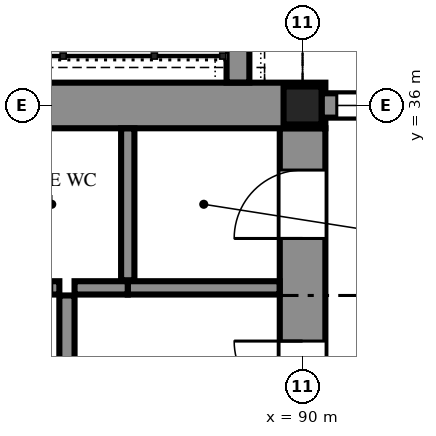
"""IFC4 building model, lengths in metres.
Left out: names, types, materials, properties, quantities, classifications, styles, units other than length and angle.
Written with IfcOpenShell. Run it as: python <this file> out.ifc"""

import sys

from ifc_helpers import new_model, si_unit, direction, frame, frame_2d, origin, origin_2d, place, context, subcontext, project, spatial, polyline, rectangle, hollow_rectangle, outline, extrude, element, fill, save


model = new_model("IFC4")
c1 = context("Model", 3, precision=1e-05, world=origin(), true_north=direction((0.0, 1.0)))
c2 = subcontext(c1, "Body", "Model", "MODEL_VIEW")
j1 = project(units=[si_unit("LENGTHUNIT", "METRE"), si_unit("PLANEANGLEUNIT", "RADIAN")], contexts=[c1])
p1 = place(None, origin())
s1 = spatial("IfcSite", under=j1, at=p1, CompositionType="ELEMENT")
p2 = place(p1, origin())
s2 = spatial("IfcBuilding", under=s1, at=p2, CompositionType="ELEMENT")
p3 = place(p2, origin())
s3 = spatial("IfcBuildingStorey", under=s2, at=p3, CompositionType="ELEMENT", Elevation=0.0)
p4 = place(p3, frame((90.0, 36.0, -2.1), z_axis=(0.0, 0.0, 1.0), x_axis=(1.0, 0.0, 0.0)))
e1 = element("IfcColumn", 1, at=p4, inside=s3, PredefinedType="COLUMN", context=c2, shape_type="SweptSolid", body=[
    extrude(hollow_rectangle(XDim=0.5, YDim=0.5, WallThickness=0.032, at=origin_2d()), origin(), (0.0, 0.0, 1.0), 9.6),
])
p5 = place(p3, frame((71.7, 36.0, -2.1), z_axis=(0.0, 0.0, 1.0), x_axis=(1.0, 0.0, 0.0)))
e2 = element("IfcWall", 2, at=p5, inside=s3, PredefinedType="SOLIDWALL", context=c2, shape_type="SweptSolid", body=[
    extrude(rectangle(XDim=18.6, YDim=0.6, at=frame_2d((9.3, 0.0))), origin(), (0.0, 0.0, 1.0), 9.6),
])
p6 = place(p5, frame((1.6, 0.0, 2.1)))
e3 = element("IfcOpeningElement", 3, at=p6, cuts=e2, PredefinedType="OPENING", context=c2, shape_type="SweptSolid", body=[
    extrude(rectangle(XDim=1.8, YDim=2.1, at=frame_2d((0.9, 1.05))), frame((0.0, 0.31, 0.0), z_axis=(0.0, -1.0, 0.0), x_axis=(1.0, 0.0, 0.0)), (0.0, 0.0, 1.0), 0.62),
])
p7 = place(p5, frame((5.6, 0.0, 2.1)))
e4 = element("IfcOpeningElement", 4, at=p7, cuts=e2, PredefinedType="OPENING", context=c2, shape_type="SweptSolid", body=[
    extrude(rectangle(XDim=1.8, YDim=2.1, at=frame_2d((0.9, 1.05))), frame((0.0, 0.31, 0.0), z_axis=(0.0, -1.0, 0.0), x_axis=(1.0, 0.0, 0.0)), (0.0, 0.0, 1.0), 0.62),
])
p8 = place(p5, frame((9.1, 0.0, 2.1)))
e5 = element("IfcOpeningElement", 5, at=p8, cuts=e2, PredefinedType="OPENING", context=c2, shape_type="SweptSolid", body=[
    extrude(rectangle(XDim=1.8, YDim=2.1, at=frame_2d((0.9, 1.05))), frame((0.0, 0.31, 0.0), z_axis=(0.0, -1.0, 0.0), x_axis=(1.0, 0.0, 0.0)), (0.0, 0.0, 1.0), 0.62),
])
p9 = place(p3, frame((90.0, 27.3, -2.1), z_axis=(0.0, 0.0, 1.0), x_axis=(0.0, 1.0, 0.0)))
e6 = element("IfcWall", 6, at=p9, inside=s3, PredefinedType="SOLIDWALL", context=c2, shape_type="SweptSolid", body=[
    extrude(rectangle(XDim=8.4, YDim=0.6, at=frame_2d((4.2, 0.0))), origin(), (0.0, 0.0, 1.0), 9.6),
])
p10 = place(p9, frame((3.8, 0.0, 2.1)))
e7 = element("IfcOpeningElement", 7, at=p10, cuts=e6, PredefinedType="OPENING", context=c2, shape_type="SweptSolid", body=[
    extrude(rectangle(XDim=1.8, YDim=2.1, at=frame_2d((0.9, 1.05))), frame((0.0, 0.31, 0.0), z_axis=(0.0, -1.0, 0.0), x_axis=(1.0, 0.0, 0.0)), (0.0, 0.0, 1.0), 0.62),
])
p11 = place(p9, frame((6.95, 0.0, 2.1)))
e8 = element("IfcOpeningElement", 8, at=p11, cuts=e6, PredefinedType="OPENING", context=c2, shape_type="SweptSolid", body=[
    extrude(rectangle(XDim=0.9, YDim=2.1, at=frame_2d((0.45, 1.05))), frame((0.0, 0.31, 0.0), z_axis=(0.0, -1.0, 0.0), x_axis=(1.0, 0.0, 0.0)), (0.0, 0.0, 1.0), 0.62),
])
p12 = place(p3, frame((90.25, 36.0, 0.0), z_axis=(0.0, 0.0, 1.0), x_axis=(1.0, 0.0, 0.0)))
e9 = element("IfcWall", 9, at=p12, inside=s3, PredefinedType="SOLIDWALL", context=c2, shape_type="SweptSolid", body=[
    extrude(rectangle(XDim=8.445, YDim=0.32, at=frame_2d((4.223, 0.0))), origin(), (0.0, 0.0, 1.0), 6.767),
])
p13 = place(p12, frame((3.05, 0.0, 0.0)))
e10 = element("IfcOpeningElement", 10, at=p13, cuts=e9, PredefinedType="OPENING", context=c2, shape_type="SweptSolid", body=[
    extrude(rectangle(XDim=2.4, YDim=3.0, at=frame_2d((1.2, 1.5))), frame((0.0, 0.17, 0.0), z_axis=(0.0, -1.0, 0.0), x_axis=(1.0, 0.0, 0.0)), (0.0, 0.0, 1.0), 0.34),
])
p14 = place(p12, frame((0.2, 0.0, 0.9)))
e11 = element("IfcOpeningElement", 11, at=p14, cuts=e9, PredefinedType="OPENING", context=c2, shape_type="SweptSolid", body=[
    extrude(rectangle(XDim=2.1, YDim=3.0, at=frame_2d((1.05, 1.5))), frame((0.0, 0.17, 0.0), z_axis=(0.0, -1.0, 0.0), x_axis=(1.0, 0.0, 0.0)), (0.0, 0.0, 1.0), 0.34),
])
p15 = place(p12, frame((6.2, 0.0, 0.9)))
e12 = element("IfcOpeningElement", 12, at=p15, cuts=e9, PredefinedType="OPENING", context=c2, shape_type="SweptSolid", body=[
    extrude(rectangle(XDim=2.1, YDim=3.0, at=frame_2d((1.05, 1.5))), frame((0.0, 0.17, 0.0), z_axis=(0.0, -1.0, 0.0), x_axis=(1.0, 0.0, 0.0)), (0.0, 0.0, 1.0), 0.34),
])
p16 = place(p3, frame((89.15, 36.302, 0.0), z_axis=(0.0, 0.0, 1.0), x_axis=(0.0, 1.0, 0.0)))
e13 = element("IfcWall", 13, at=p16, inside=s3, PredefinedType="SOLIDWALL", context=c2, shape_type="SweptSolid", body=[
    extrude(rectangle(XDim=8.098, YDim=0.3, at=frame_2d((4.049, 0.0))), origin(), (0.0, 0.0, 1.0), 6.902),
])
p17 = place(p3, frame((86.9, 33.5, 0.0), z_axis=(0.0, 0.0, 1.0), x_axis=(0.0, -1.0, 0.0)))
e14 = element("IfcWall", 14, at=p17, inside=s3, PredefinedType="PARTITIONING", context=c2, shape_type="SweptSolid", body=[
    extrude(rectangle(XDim=3.1, YDim=0.2, at=frame_2d((1.55, 0.0))), origin(), (0.0, 0.0, 1.0), 6.6),
])
p18 = place(p17, frame((0.9, 0.0, 0.0)))
e15 = element("IfcOpeningElement", 15, at=p18, cuts=e14, PredefinedType="OPENING", context=c2, shape_type="SweptSolid", body=[
    extrude(rectangle(XDim=1.2, YDim=2.1, at=frame_2d((0.6, 1.05))), frame((0.0, 0.11, 0.0), z_axis=(0.0, -1.0, 0.0), x_axis=(1.0, 0.0, 0.0)), (0.0, 0.0, 1.0), 0.22),
])
p19 = place(p3, frame((85.7, 33.6, 0.0), z_axis=(0.0, 0.0, 1.0), x_axis=(1.0, 0.0, 0.0)))
e16 = element("IfcWall", 16, at=p19, inside=s3, PredefinedType="PARTITIONING", context=c2, shape_type="SweptSolid", body=[
    extrude(rectangle(XDim=1.1, YDim=0.175, at=frame_2d((0.55, 0.0))), origin(), (0.0, 0.0, 1.0), 6.459),
])
p20 = place(p19, frame((0.1, 0.0, 0.0)))
e17 = element("IfcOpeningElement", 17, at=p20, cuts=e16, PredefinedType="OPENING", context=c2, shape_type="SweptSolid", body=[
    extrude(rectangle(XDim=0.9, YDim=2.1, at=frame_2d((0.45, 1.05))), frame((0.0, 0.097, 0.0), z_axis=(0.0, -1.0, 0.0), x_axis=(1.0, 0.0, 0.0)), (0.0, 0.0, 1.0), 0.195),
])
p21 = place(p3, frame((87.7, 33.6, 0.0), z_axis=(0.0, 0.0, 1.0), x_axis=(1.0, 0.0, 0.0)))
e18 = element("IfcWall", 18, at=p21, inside=s3, PredefinedType="PARTITIONING", context=c2, shape_type="SweptSolid", body=[
    extrude(rectangle(XDim=1.998, YDim=0.175, at=frame_2d((0.999, 0.0))), origin(), (0.0, 0.0, 1.0), 6.459),
])
p22 = place(p3, frame((87.0, 33.6, 0.0), z_axis=(0.0, 0.0, 1.0), x_axis=(1.0, 0.0, 0.0)))
e19 = element("IfcWall", 19, at=p22, inside=s3, PredefinedType="PARTITIONING", context=c2, shape_type="SweptSolid", body=[
    extrude(rectangle(XDim=0.7, YDim=0.175, at=frame_2d((0.35, 0.0))), origin(), (0.0, 0.0, 1.0), 6.459),
])
p23 = place(p3, frame((87.7, 35.698, 0.0), z_axis=(0.0, 0.0, 1.0), x_axis=(0.0, -1.0, 0.0)))
e20 = element("IfcWall", 20, at=p23, inside=s3, PredefinedType="PARTITIONING", context=c2, shape_type="SweptSolid", body=[
    extrude(rectangle(XDim=1.998, YDim=0.175, at=frame_2d((0.999, 0.0))), origin(), (0.0, 0.0, 1.0), 6.459),
])
p24 = place(p14, origin())
e21 = element("IfcWindow", 21, at=p24, inside=s3, PartitioningType="DOUBLE_PANEL_VERTICAL", PredefinedType="WINDOW", context=c2, shape_type="SweptSolid", body=[
    extrude(outline(polyline([(0.0, 0.0), (2.1, 0.0), (2.1, 3.0), (0.0, 3.0), (0.0, 0.0)]), holes=[polyline([(0.07, 0.07), (2.03, 0.07), (2.03, 2.93), (0.07, 2.93), (0.07, 0.07)])]), frame((0.0, 0.03, 0.0), z_axis=(0.0, -1.0, 0.0), x_axis=(1.0, 0.0, 0.0)), (0.0, 0.0, 1.0), 0.06),
    extrude(rectangle(XDim=0.04, YDim=2.86, at=frame_2d((1.05, 1.5))), frame((0.0, 0.022, 0.0), z_axis=(0.0, -1.0, 0.0), x_axis=(1.0, 0.0, 0.0)), (0.0, 0.0, 1.0), 0.044),
    extrude(outline(polyline([(0.07, 0.07), (1.03, 0.07), (1.03, 2.93), (0.07, 2.93), (0.07, 0.07)]), holes=[polyline([(0.1, 0.1), (1.0, 0.1), (1.0, 2.9), (0.1, 2.9), (0.1, 0.1)])]), frame((0.0, 0.022, 0.0), z_axis=(0.0, -1.0, 0.0), x_axis=(1.0, 0.0, 0.0)), (0.0, 0.0, 1.0), 0.045),
    extrude(rectangle(XDim=0.9, YDim=2.8, at=frame_2d((0.55, 1.5))), frame((0.0, 0.006, 0.0), z_axis=(0.0, -1.0, 0.0), x_axis=(1.0, 0.0, 0.0)), (0.0, 0.0, 1.0), 0.012),
    extrude(outline(polyline([(1.07, 0.07), (2.03, 0.07), (2.03, 2.93), (1.07, 2.93), (1.07, 0.07)]), holes=[polyline([(1.1, 0.1), (2.0, 0.1), (2.0, 2.9), (1.1, 2.9), (1.1, 0.1)])]), frame((0.0, 0.022, 0.0), z_axis=(0.0, -1.0, 0.0), x_axis=(1.0, 0.0, 0.0)), (0.0, 0.0, 1.0), 0.045),
    extrude(rectangle(XDim=0.9, YDim=2.8, at=frame_2d((1.55, 1.5))), frame((0.0, 0.006, 0.0), z_axis=(0.0, -1.0, 0.0), x_axis=(1.0, 0.0, 0.0)), (0.0, 0.0, 1.0), 0.012),
])
fill(e11, e21)
p25 = place(p10, origin())
e22 = element("IfcDoor", 22, at=p25, inside=s3, OperationType="DOUBLE_DOOR_SINGLE_SWING", PredefinedType="DOOR", context=c2, shape_type="SweptSolid", body=[
    extrude(outline(polyline([(0.0, 0.0), (0.07, 0.0), (0.07, 2.03), (1.73, 2.03), (1.73, 0.0), (1.8, 0.0), (1.8, 2.1), (0.0, 2.1), (0.0, 0.0)])), frame((0.0, 0.025, 0.0), z_axis=(0.0, -1.0, 0.0), x_axis=(1.0, 0.0, 0.0)), (0.0, 0.0, 1.0), 0.05),
    extrude(outline(polyline([(0.074, 0.01), (0.897, 0.01), (0.897, 2.026), (0.074, 2.026), (0.074, 0.01)]), holes=[polyline([(0.194, 0.16), (0.777, 0.16), (0.777, 1.01), (0.194, 1.01), (0.194, 0.16)]), polyline([(0.335, 1.16), (0.635, 1.16), (0.635, 1.76), (0.335, 1.76), (0.335, 1.16)])]), frame((0.0, 0.017, 0.0), z_axis=(0.0, -1.0, 0.0), x_axis=(1.0, 0.0, 0.0)), (0.0, 0.0, 1.0), 0.035),
    extrude(rectangle(XDim=0.583, YDim=0.85, at=frame_2d((0.485, 0.585))), frame((0.0, 0.009, 0.0), z_axis=(0.0, -1.0, 0.0), x_axis=(1.0, 0.0, 0.0)), (0.0, 0.0, 1.0), 0.017),
    extrude(rectangle(XDim=0.3, YDim=0.6, at=frame_2d((0.485, 1.46))), frame((0.0, 0.006, 0.0), z_axis=(0.0, -1.0, 0.0), x_axis=(1.0, 0.0, 0.0)), (0.0, 0.0, 1.0), 0.012),
    extrude(outline(polyline([(0.903, 0.01), (1.726, 0.01), (1.726, 2.026), (0.903, 2.026), (0.903, 0.01)]), holes=[polyline([(1.023, 0.16), (1.606, 0.16), (1.606, 1.01), (1.023, 1.01), (1.023, 0.16)]), polyline([(1.165, 1.16), (1.465, 1.16), (1.465, 1.76), (1.165, 1.76), (1.165, 1.16)])]), frame((0.0, 0.017, 0.0), z_axis=(0.0, -1.0, 0.0), x_axis=(1.0, 0.0, 0.0)), (0.0, 0.0, 1.0), 0.035),
    extrude(rectangle(XDim=0.583, YDim=0.85, at=frame_2d((1.314, 0.585))), frame((0.0, 0.009, 0.0), z_axis=(0.0, -1.0, 0.0), x_axis=(1.0, 0.0, 0.0)), (0.0, 0.0, 1.0), 0.017),
    extrude(rectangle(XDim=0.3, YDim=0.6, at=frame_2d((1.314, 1.46))), frame((0.0, 0.006, 0.0), z_axis=(0.0, -1.0, 0.0), x_axis=(1.0, 0.0, 0.0)), (0.0, 0.0, 1.0), 0.012),
])
fill(e7, e22)
p26 = place(p11, origin())
e23 = element("IfcDoor", 23, at=p26, inside=s3, OperationType="SINGLE_SWING_LEFT", PredefinedType="DOOR", context=c2, shape_type="SweptSolid", body=[
    extrude(outline(polyline([(0.0, 0.0), (0.07, 0.0), (0.07, 2.03), (0.83, 2.03), (0.83, 0.0), (0.9, 0.0), (0.9, 2.1), (0.0, 2.1), (0.0, 0.0)])), frame((0.0, 0.025, 0.0), z_axis=(0.0, -1.0, 0.0), x_axis=(1.0, 0.0, 0.0)), (0.0, 0.0, 1.0), 0.05),
    extrude(outline(polyline([(0.074, 0.01), (0.826, 0.01), (0.826, 2.026), (0.074, 2.026), (0.074, 0.01)]), holes=[polyline([(0.194, 0.16), (0.706, 0.16), (0.706, 1.01), (0.194, 1.01), (0.194, 0.16)]), polyline([(0.3, 1.16), (0.6, 1.16), (0.6, 1.76), (0.3, 1.76), (0.3, 1.16)])]), frame((0.0, 0.017, 0.0), z_axis=(0.0, -1.0, 0.0), x_axis=(1.0, 0.0, 0.0)), (0.0, 0.0, 1.0), 0.035),
    extrude(rectangle(XDim=0.512, YDim=0.85, at=frame_2d((0.45, 0.585))), frame((0.0, 0.009, 0.0), z_axis=(0.0, -1.0, 0.0), x_axis=(1.0, 0.0, 0.0)), (0.0, 0.0, 1.0), 0.017),
    extrude(rectangle(XDim=0.3, YDim=0.6, at=frame_2d((0.45, 1.46))), frame((0.0, 0.006, 0.0), z_axis=(0.0, -1.0, 0.0), x_axis=(1.0, 0.0, 0.0)), (0.0, 0.0, 1.0), 0.012),
])
fill(e8, e23)
save(model, sys.argv[1])
